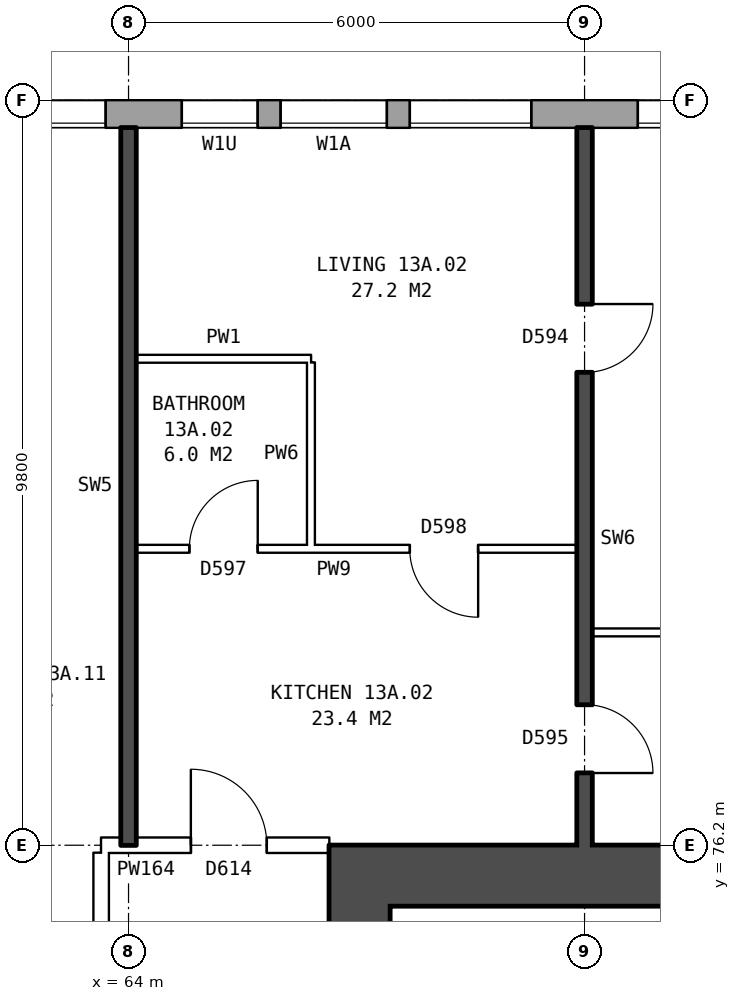
"""IFC4 building model, lengths in metres.
Left out: names, types, materials, properties, quantities, classifications, styles, units other than length and angle.
Written with IfcOpenShell. Run it as: python <this file> out.ifc"""

import sys

from ifc_helpers import new_model, si_unit, direction, frame, frame_2d, origin, place, context, subcontext, project, spatial, rectangle, extrude, element, fill, save


model = new_model("IFC4")
c1 = context("Model", 3, precision=1e-05, world=origin(), true_north=direction((0.0, 1.0)))
c2 = subcontext(c1, "Body", "Model", "MODEL_VIEW")
j1 = project(units=[si_unit("LENGTHUNIT", "METRE"), si_unit("PLANEANGLEUNIT", "RADIAN")], contexts=[c1])
p1 = place(None, origin())
s1 = spatial("IfcSite", under=j1, at=p1, CompositionType="ELEMENT")
p2 = place(p1, origin())
s2 = spatial("IfcBuilding", under=s1, at=p2, CompositionType="ELEMENT")
p3 = place(p2, frame((0.0, 0.0, 50.5)))
s3 = spatial("IfcBuildingStorey", under=s2, at=p3, CompositionType="ELEMENT", Elevation=50.5)
p4 = place(p3, frame((72.925, 85.82, 0.0), z_axis=(0.0, 0.0, 1.0), x_axis=(-1.0, 0.0, 0.0)))
e1 = element("IfcWall", 1, at=p4, inside=s3, PredefinedType="STANDARD", context=c2, shape_type="SweptSolid", body=[
    extrude(rectangle(XDim=48.351, YDim=0.36, at=frame_2d((24.175, 0.0))), origin(), (0.0, 0.0, 1.0), 2.85),
])
p5 = place(p4, frame((0.625, 0.0, 0.8)))
e2 = element("IfcOpeningElement", 2, at=p5, cuts=e1, PredefinedType="OPENING", context=c2, shape_type="SweptSolid", body=[
    extrude(rectangle(XDim=1.6, YDim=1.8, at=frame_2d((0.8, 0.9))), frame((0.0, 0.19, 0.0), z_axis=(0.0, -1.0, 0.0), x_axis=(1.0, 0.0, 0.0)), (0.0, 0.0, 1.0), 0.38),
])
p6 = place(p4, frame((3.625, 0.0, 0.8)))
e3 = element("IfcOpeningElement", 3, at=p6, cuts=e1, PredefinedType="OPENING", context=c2, shape_type="SweptSolid", body=[
    extrude(rectangle(XDim=1.6, YDim=1.8, at=frame_2d((0.8, 0.9))), frame((0.0, 0.19, 0.0), z_axis=(0.0, -1.0, 0.0), x_axis=(1.0, 0.0, 0.0)), (0.0, 0.0, 1.0), 0.38),
])
p7 = place(p4, frame((5.525, 0.0, 0.8)))
e4 = element("IfcOpeningElement", 4, at=p7, cuts=e1, PredefinedType="OPENING", context=c2, shape_type="SweptSolid", body=[
    extrude(rectangle(XDim=1.4, YDim=1.8, at=frame_2d((0.7, 0.9))), frame((0.0, 0.19, 0.0), z_axis=(0.0, -1.0, 0.0), x_axis=(1.0, 0.0, 0.0)), (0.0, 0.0, 1.0), 0.38),
])
p8 = place(p4, frame((9.225, 0.0, 0.45)))
e5 = element("IfcOpeningElement", 5, at=p8, cuts=e1, PredefinedType="OPENING", context=c2, shape_type="SweptSolid", body=[
    extrude(rectangle(XDim=1.0, YDim=0.9, at=frame_2d((0.5, 0.45))), frame((0.0, 0.19, 0.0), z_axis=(0.0, -1.0, 0.0), x_axis=(1.0, 0.0, 0.0)), (0.0, 0.0, 1.0), 0.38),
])
p9 = place(p4, frame((12.625, 0.0, 0.8)))
e6 = element("IfcOpeningElement", 6, at=p9, cuts=e1, PredefinedType="OPENING", context=c2, shape_type="SweptSolid", body=[
    extrude(rectangle(XDim=1.6, YDim=1.8, at=frame_2d((0.8, 0.9))), frame((0.0, 0.19, 0.0), z_axis=(0.0, -1.0, 0.0), x_axis=(1.0, 0.0, 0.0)), (0.0, 0.0, 1.0), 0.38),
])
p10 = place(p4, frame((15.625, 0.0, 0.8)))
e7 = element("IfcOpeningElement", 7, at=p10, cuts=e1, PredefinedType="OPENING", context=c2, shape_type="SweptSolid", body=[
    extrude(rectangle(XDim=1.6, YDim=1.8, at=frame_2d((0.8, 0.9))), frame((0.0, 0.19, 0.0), z_axis=(0.0, -1.0, 0.0), x_axis=(1.0, 0.0, 0.0)), (0.0, 0.0, 1.0), 0.38),
])
p11 = place(p4, frame((18.625, 0.0, 0.8)))
e8 = element("IfcOpeningElement", 8, at=p11, cuts=e1, PredefinedType="OPENING", context=c2, shape_type="SweptSolid", body=[
    extrude(rectangle(XDim=1.6, YDim=1.8, at=frame_2d((0.8, 0.9))), frame((0.0, 0.19, 0.0), z_axis=(0.0, -1.0, 0.0), x_axis=(1.0, 0.0, 0.0)), (0.0, 0.0, 1.0), 0.38),
])
p12 = place(p4, frame((21.625, 0.0, 0.8)))
e9 = element("IfcOpeningElement", 9, at=p12, cuts=e1, PredefinedType="OPENING", context=c2, shape_type="SweptSolid", body=[
    extrude(rectangle(XDim=1.6, YDim=1.8, at=frame_2d((0.8, 0.9))), frame((0.0, 0.19, 0.0), z_axis=(0.0, -1.0, 0.0), x_axis=(1.0, 0.0, 0.0)), (0.0, 0.0, 1.0), 0.38),
])
p13 = place(p4, frame((24.625, 0.0, 0.8)))
e10 = element("IfcOpeningElement", 10, at=p13, cuts=e1, PredefinedType="OPENING", context=c2, shape_type="SweptSolid", body=[
    extrude(rectangle(XDim=1.6, YDim=1.8, at=frame_2d((0.8, 0.9))), frame((0.0, 0.19, 0.0), z_axis=(0.0, -1.0, 0.0), x_axis=(1.0, 0.0, 0.0)), (0.0, 0.0, 1.0), 0.38),
])
p14 = place(p4, frame((27.625, 0.0, 0.8)))
e11 = element("IfcOpeningElement", 11, at=p14, cuts=e1, PredefinedType="OPENING", context=c2, shape_type="SweptSolid", body=[
    extrude(rectangle(XDim=1.6, YDim=1.8, at=frame_2d((0.8, 0.9))), frame((0.0, 0.19, 0.0), z_axis=(0.0, -1.0, 0.0), x_axis=(1.0, 0.0, 0.0)), (0.0, 0.0, 1.0), 0.38),
])
p15 = place(p4, frame((30.625, 0.0, 0.8)))
e12 = element("IfcOpeningElement", 12, at=p15, cuts=e1, PredefinedType="OPENING", context=c2, shape_type="SweptSolid", body=[
    extrude(rectangle(XDim=1.6, YDim=1.8, at=frame_2d((0.8, 0.9))), frame((0.0, 0.19, 0.0), z_axis=(0.0, -1.0, 0.0), x_axis=(1.0, 0.0, 0.0)), (0.0, 0.0, 1.0), 0.38),
])
p16 = place(p4, frame((33.625, 0.0, 0.8)))
e13 = element("IfcOpeningElement", 13, at=p16, cuts=e1, PredefinedType="OPENING", context=c2, shape_type="SweptSolid", body=[
    extrude(rectangle(XDim=1.6, YDim=1.8, at=frame_2d((0.8, 0.9))), frame((0.0, 0.19, 0.0), z_axis=(0.0, -1.0, 0.0), x_axis=(1.0, 0.0, 0.0)), (0.0, 0.0, 1.0), 0.38),
])
p17 = place(p4, frame((36.125, 0.0, 0.8)))
e14 = element("IfcOpeningElement", 14, at=p17, cuts=e1, PredefinedType="OPENING", context=c2, shape_type="SweptSolid", body=[
    extrude(rectangle(XDim=1.0, YDim=1.8, at=frame_2d((0.5, 0.9))), frame((0.0, 0.19, 0.0), z_axis=(0.0, -1.0, 0.0), x_axis=(1.0, 0.0, 0.0)), (0.0, 0.0, 1.0), 0.38),
])
p18 = place(p4, frame((39.975, 0.0, 1.7)))
e15 = element("IfcOpeningElement", 15, at=p18, cuts=e1, PredefinedType="OPENING", context=c2, shape_type="SweptSolid", body=[
    extrude(rectangle(XDim=1.0, YDim=0.9, at=frame_2d((0.5, 0.45))), frame((0.0, 0.19, 0.0), z_axis=(0.0, -1.0, 0.0), x_axis=(1.0, 0.0, 0.0)), (0.0, 0.0, 1.0), 0.38),
])
p19 = place(p4, frame((42.625, 0.0, 0.8)))
e16 = element("IfcOpeningElement", 16, at=p19, cuts=e1, PredefinedType="OPENING", context=c2, shape_type="SweptSolid", body=[
    extrude(rectangle(XDim=1.6, YDim=1.8, at=frame_2d((0.8, 0.9))), frame((0.0, 0.19, 0.0), z_axis=(0.0, -1.0, 0.0), x_axis=(1.0, 0.0, 0.0)), (0.0, 0.0, 1.0), 0.38),
])
p20 = place(p4, frame((45.625, 0.0, 0.8)))
e17 = element("IfcOpeningElement", 17, at=p20, cuts=e1, PredefinedType="OPENING", context=c2, shape_type="SweptSolid", body=[
    extrude(rectangle(XDim=1.6, YDim=1.8, at=frame_2d((0.8, 0.9))), frame((0.0, 0.19, 0.0), z_axis=(0.0, -1.0, 0.0), x_axis=(1.0, 0.0, 0.0)), (0.0, 0.0, 1.0), 0.38),
])
p21 = place(p4, frame((7.225, 0.0, 1.6)))
e18 = element("IfcOpeningElement", 18, at=p21, cuts=e1, PredefinedType="OPENING", context=c2, shape_type="SweptSolid", body=[
    extrude(rectangle(XDim=1.0, YDim=0.9, at=frame_2d((0.5, 0.45))), frame((0.0, 0.19, 0.0), z_axis=(0.0, -1.0, 0.0), x_axis=(1.0, 0.0, 0.0)), (0.0, 0.0, 1.0), 0.38),
])
p22 = place(p4, frame((10.575, 0.0, 0.45)))
e19 = element("IfcOpeningElement", 19, at=p22, cuts=e1, PredefinedType="OPENING", context=c2, shape_type="SweptSolid", body=[
    extrude(rectangle(XDim=1.2, YDim=1.8, at=frame_2d((0.6, 0.9))), frame((0.0, 0.19, 0.0), z_axis=(0.0, -1.0, 0.0), x_axis=(1.0, 0.0, 0.0)), (0.0, 0.0, 1.0), 0.38),
])
p23 = place(p4, frame((37.425, 0.0, 0.8)))
e20 = element("IfcOpeningElement", 20, at=p23, cuts=e1, PredefinedType="OPENING", context=c2, shape_type="SweptSolid", body=[
    extrude(rectangle(XDim=1.0, YDim=0.9, at=frame_2d((0.5, 0.45))), frame((0.0, 0.19, 0.0), z_axis=(0.0, -1.0, 0.0), x_axis=(1.0, 0.0, 0.0)), (0.0, 0.0, 1.0), 0.38),
])
p24 = place(p4, frame((41.275, 0.0, 0.8)))
e21 = element("IfcOpeningElement", 21, at=p24, cuts=e1, PredefinedType="OPENING", context=c2, shape_type="SweptSolid", body=[
    extrude(rectangle(XDim=1.0, YDim=1.8, at=frame_2d((0.5, 0.9))), frame((0.0, 0.19, 0.0), z_axis=(0.0, -1.0, 0.0), x_axis=(1.0, 0.0, 0.0)), (0.0, 0.0, 1.0), 0.38),
])
p25 = place(p3, frame((67.04, 64.6, 0.0), z_axis=(0.0, 0.0, 1.0), x_axis=(0.0, 1.0, 0.0)))
e22 = element("IfcWall", 22, at=p25, inside=s3, PredefinedType="SHEAR", context=c2, shape_type="SweptSolid", body=[
    extrude(rectangle(XDim=10.8, YDim=0.8, at=frame_2d((5.4, 0.0))), origin(), (0.0, 0.0, 1.0), 2.85),
])
p26 = place(p25, frame((0.525, 0.0, 0.0)))
e23 = element("IfcOpeningElement", 23, at=p26, cuts=e22, PredefinedType="OPENING", context=c2, shape_type="SweptSolid", body=[
    extrude(rectangle(XDim=1.1, YDim=2.1, at=frame_2d((0.55, 1.05))), frame((0.0, 0.41, 0.0), z_axis=(0.0, -1.0, 0.0), x_axis=(1.0, 0.0, 0.0)), (0.0, 0.0, 1.0), 0.82),
])
p27 = place(p25, frame((9.1, 0.0, 0.0)))
e24 = element("IfcOpeningElement", 24, at=p27, cuts=e22, PredefinedType="OPENING", context=c2, shape_type="SweptSolid", body=[
    extrude(rectangle(XDim=1.1, YDim=2.1, at=frame_2d((0.55, 1.05))), frame((0.0, 0.41, 0.0), z_axis=(0.0, -1.0, 0.0), x_axis=(1.0, 0.0, 0.0)), (0.0, 0.0, 1.0), 0.82),
])
p28 = place(p3, frame((66.64, 75.8, 0.0), z_axis=(0.0, 0.0, 1.0), x_axis=(1.0, 0.0, 0.0)))
e25 = element("IfcWall", 25, at=p28, inside=s3, PredefinedType="SHEAR", context=c2, shape_type="SweptSolid", body=[
    extrude(rectangle(XDim=9.0, YDim=0.8, at=frame_2d((4.5, 0.0))), origin(), (0.0, 0.0, 1.0), 2.85),
])
p29 = place(p3, frame((63.64, 63.9, 0.0), z_axis=(0.0, 0.0, 1.0), x_axis=(0.0, 1.0, 0.0)))
e26 = element("IfcWall", 26, at=p29, inside=s3, PredefinedType="PARTITIONING", context=c2, shape_type="SweptSolid", body=[
    extrude(rectangle(XDim=12.2, YDim=0.2, at=frame_2d((6.1, 0.0))), origin(), (0.0, 0.0, 1.0), 2.85),
])
p30 = place(p29, frame((5.1, 0.0, 0.0)))
e27 = element("IfcOpeningElement", 27, at=p30, cuts=e26, PredefinedType="OPENING", context=c2, shape_type="SweptSolid", body=[
    extrude(rectangle(XDim=2.0, YDim=2.1, at=frame_2d((1.0, 1.05))), frame((0.0, 0.11, 0.0), z_axis=(0.0, -1.0, 0.0), x_axis=(1.0, 0.0, 0.0)), (0.0, 0.0, 1.0), 0.22),
])
p31 = place(p3, frame((63.64, 76.2, 0.0), z_axis=(0.0, 0.0, 1.0), x_axis=(1.0, 0.0, 0.0)))
e28 = element("IfcWall", 28, at=p31, inside=s3, PredefinedType="PARTITIONING", context=c2, shape_type="SweptSolid", body=[
    extrude(rectangle(XDim=3.0, YDim=0.2, at=frame_2d((1.5, 0.0))), origin(), (0.0, 0.0, 1.0), 2.85),
])
p32 = place(p31, frame((1.18, 0.0, 0.0)))
e29 = element("IfcOpeningElement", 29, at=p32, cuts=e28, PredefinedType="OPENING", context=c2, shape_type="SweptSolid", body=[
    extrude(rectangle(XDim=1.0, YDim=2.1, at=frame_2d((0.5, 1.05))), frame((0.0, 0.11, 0.0), z_axis=(0.0, -1.0, 0.0), x_axis=(1.0, 0.0, 0.0)), (0.0, 0.0, 1.0), 0.22),
])
p33 = place(p3, frame((70.1, 79.0, 0.0), z_axis=(0.0, 0.0, 1.0), x_axis=(1.0, 0.0, 0.0)))
e30 = element("IfcWall", 30, at=p33, inside=s3, PredefinedType="PARTITIONING", context=c2, shape_type="SweptSolid", body=[
    extrude(rectangle(XDim=5.54, YDim=0.1, at=frame_2d((2.77, 0.0))), origin(), (0.0, 0.0, 1.0), 2.85),
])
p34 = place(p3, frame((64.1, 80.1, 0.0), z_axis=(0.0, 0.0, 1.0), x_axis=(1.0, 0.0, 0.0)))
e31 = element("IfcWall", 31, at=p34, inside=s3, PredefinedType="PARTITIONING", context=c2, shape_type="SweptSolid", body=[
    extrude(rectangle(XDim=5.8, YDim=0.1, at=frame_2d((2.9, 0.0))), origin(), (0.0, 0.0, 1.0), 2.85),
])
p35 = place(p34, frame((3.6, 0.0, 0.0)))
e32 = element("IfcOpeningElement", 32, at=p35, cuts=e31, PredefinedType="OPENING", context=c2, shape_type="SweptSolid", body=[
    extrude(rectangle(XDim=0.9, YDim=2.1, at=frame_2d((0.45, 1.05))), frame((0.0, 0.06, 0.0), z_axis=(0.0, -1.0, 0.0), x_axis=(1.0, 0.0, 0.0)), (0.0, 0.0, 1.0), 0.12),
])
p36 = place(p34, frame((0.7, 0.0, 0.0)))
e33 = element("IfcOpeningElement", 33, at=p36, cuts=e31, PredefinedType="OPENING", context=c2, shape_type="SweptSolid", body=[
    extrude(rectangle(XDim=0.9, YDim=2.1, at=frame_2d((0.45, 1.05))), frame((0.0, 0.06, 0.0), z_axis=(0.0, -1.0, 0.0), x_axis=(1.0, 0.0, 0.0)), (0.0, 0.0, 1.0), 0.12),
])
p37 = place(p3, frame((64.1, 82.6, 0.0), z_axis=(0.0, 0.0, 1.0), x_axis=(1.0, 0.0, 0.0)))
e34 = element("IfcWall", 34, at=p37, inside=s3, PredefinedType="PARTITIONING", context=c2, shape_type="SweptSolid", body=[
    extrude(rectangle(XDim=2.3, YDim=0.1, at=frame_2d((1.15, 0.0))), origin(), (0.0, 0.0, 1.0), 2.85),
])
p38 = place(p3, frame((64.0, 76.2, 0.0), z_axis=(0.0, 0.0, 1.0), x_axis=(0.0, 1.0, 0.0)))
e35 = element("IfcWall", 35, at=p38, inside=s3, PredefinedType="SOLIDWALL", context=c2, shape_type="SweptSolid", body=[
    extrude(rectangle(XDim=9.44, YDim=0.2, at=frame_2d((4.72, 0.0))), origin(), (0.0, 0.0, 1.0), 2.85),
])
p39 = place(p3, frame((66.4, 80.15, 0.0), z_axis=(0.0, 0.0, 1.0), x_axis=(0.0, 1.0, 0.0)))
e36 = element("IfcWall", 36, at=p39, inside=s3, PredefinedType="PARTITIONING", context=c2, shape_type="SweptSolid", body=[
    extrude(rectangle(XDim=2.4, YDim=0.1, at=frame_2d((1.2, 0.0))), origin(), (0.0, 0.0, 1.0), 2.85),
])
p40 = place(p3, frame((70.0, 76.2, 0.0), z_axis=(0.0, 0.0, 1.0), x_axis=(0.0, 1.0, 0.0)))
e37 = element("IfcWall", 37, at=p40, inside=s3, PredefinedType="SOLIDWALL", context=c2, shape_type="SweptSolid", body=[
    extrude(rectangle(XDim=9.44, YDim=0.2, at=frame_2d((4.72, 0.0))), origin(), (0.0, 0.0, 1.0), 2.85),
])
p41 = place(p40, frame((6.22, 0.0, 0.0)))
e38 = element("IfcOpeningElement", 38, at=p41, cuts=e37, PredefinedType="OPENING", context=c2, shape_type="SweptSolid", body=[
    extrude(rectangle(XDim=0.9, YDim=2.1, at=frame_2d((0.45, 1.05))), frame((0.0, 0.11, 0.0), z_axis=(0.0, -1.0, 0.0), x_axis=(1.0, 0.0, 0.0)), (0.0, 0.0, 1.0), 0.22),
])
p42 = place(p40, frame((0.95, 0.0, 0.0)))
e39 = element("IfcOpeningElement", 39, at=p42, cuts=e37, PredefinedType="OPENING", context=c2, shape_type="SweptSolid", body=[
    extrude(rectangle(XDim=0.9, YDim=2.1, at=frame_2d((0.45, 1.05))), frame((0.0, 0.11, 0.0), z_axis=(0.0, -1.0, 0.0), x_axis=(1.0, 0.0, 0.0)), (0.0, 0.0, 1.0), 0.22),
])
p43 = place(p5, origin())
e40 = element("IfcWindow", 40, at=p43, inside=s3, PartitioningType="SINGLE_PANEL", PredefinedType="WINDOW", context=c2, shape_type="SweptSolid", body=[
    extrude(rectangle(XDim=1.6, YDim=1.8, at=frame_2d((0.8, 0.9))), frame((0.0, 0.15, 0.0), z_axis=(0.0, -1.0, 0.0), x_axis=(1.0, 0.0, 0.0)), (0.0, 0.0, 1.0), 0.06),
])
fill(e2, e40)
p44 = place(p6, origin())
e41 = element("IfcWindow", 41, at=p44, inside=s3, PartitioningType="SINGLE_PANEL", PredefinedType="WINDOW", context=c2, shape_type="SweptSolid", body=[
    extrude(rectangle(XDim=1.6, YDim=1.8, at=frame_2d((0.8, 0.9))), frame((0.0, 0.15, 0.0), z_axis=(0.0, -1.0, 0.0), x_axis=(1.0, 0.0, 0.0)), (0.0, 0.0, 1.0), 0.06),
])
fill(e3, e41)
p45 = place(p7, origin())
e42 = element("IfcWindow", 42, at=p45, inside=s3, PartitioningType="SINGLE_PANEL", PredefinedType="WINDOW", context=c2, shape_type="SweptSolid", body=[
    extrude(rectangle(XDim=1.4, YDim=1.8, at=frame_2d((0.7, 0.9))), frame((0.0, 0.15, 0.0), z_axis=(0.0, -1.0, 0.0), x_axis=(1.0, 0.0, 0.0)), (0.0, 0.0, 1.0), 0.06),
])
fill(e4, e42)
p46 = place(p8, origin())
e43 = element("IfcWindow", 43, at=p46, inside=s3, PartitioningType="SINGLE_PANEL", PredefinedType="WINDOW", context=c2, shape_type="SweptSolid", body=[
    extrude(rectangle(XDim=1.0, YDim=0.9, at=frame_2d((0.5, 0.45))), frame((0.0, 0.15, 0.0), z_axis=(0.0, -1.0, 0.0), x_axis=(1.0, 0.0, 0.0)), (0.0, 0.0, 1.0), 0.06),
])
fill(e5, e43)
p47 = place(p41, frame((0.9, 0.0, 0.0), z_axis=(0.0, 0.0, 1.0), x_axis=(-1.0, 0.0, 0.0)))
e44 = element("IfcDoor", 44, at=p47, inside=s3, OperationType="SINGLE_SWING_LEFT", PredefinedType="DOOR", context=c2, shape_type="SweptSolid", body=[
    extrude(rectangle(XDim=0.9, YDim=2.1, at=frame_2d((0.45, 1.05))), frame((0.0, 0.025, 0.0), z_axis=(0.0, -1.0, 0.0), x_axis=(1.0, 0.0, 0.0)), (0.0, 0.0, 1.0), 0.05),
])
fill(e38, e44)
p48 = place(p42, frame((0.9, 0.0, 0.0), z_axis=(0.0, 0.0, 1.0), x_axis=(-1.0, 0.0, 0.0)))
e45 = element("IfcDoor", 45, at=p48, inside=s3, OperationType="SINGLE_SWING_RIGHT", PredefinedType="DOOR", context=c2, shape_type="SweptSolid", body=[
    extrude(rectangle(XDim=0.9, YDim=2.1, at=frame_2d((0.45, 1.05))), frame((0.0, 0.025, 0.0), z_axis=(0.0, -1.0, 0.0), x_axis=(1.0, 0.0, 0.0)), (0.0, 0.0, 1.0), 0.05),
])
fill(e39, e45)
p49 = place(p32, origin())
e46 = element("IfcDoor", 46, at=p49, inside=s3, OperationType="SINGLE_SWING_LEFT", PredefinedType="DOOR", context=c2, shape_type="SweptSolid", body=[
    extrude(rectangle(XDim=1.0, YDim=2.1, at=frame_2d((0.5, 1.05))), frame((0.0, 0.025, 0.0), z_axis=(0.0, -1.0, 0.0), x_axis=(1.0, 0.0, 0.0)), (0.0, 0.0, 1.0), 0.05),
])
fill(e29, e46)
p50 = place(p35, frame((0.9, 0.0, 0.0), z_axis=(0.0, 0.0, 1.0), x_axis=(-1.0, 0.0, 0.0)))
e47 = element("IfcDoor", 47, at=p50, inside=s3, OperationType="SINGLE_SWING_LEFT", PredefinedType="DOOR", context=c2, shape_type="SweptSolid", body=[
    extrude(rectangle(XDim=0.9, YDim=2.1, at=frame_2d((0.45, 1.05))), frame((0.0, 0.025, 0.0), z_axis=(0.0, -1.0, 0.0), x_axis=(1.0, 0.0, 0.0)), (0.0, 0.0, 1.0), 0.05),
])
fill(e32, e47)
p51 = place(p36, origin())
e48 = element("IfcDoor", 48, at=p51, inside=s3, OperationType="SINGLE_SWING_RIGHT", PredefinedType="DOOR", context=c2, shape_type="SweptSolid", body=[
    extrude(rectangle(XDim=0.9, YDim=2.1, at=frame_2d((0.45, 1.05))), frame((0.0, 0.025, 0.0), z_axis=(0.0, -1.0, 0.0), x_axis=(1.0, 0.0, 0.0)), (0.0, 0.0, 1.0), 0.05),
])
fill(e33, e48)
p52 = place(p21, origin())
e49 = element("IfcWindow", 49, at=p52, inside=s3, PartitioningType="SINGLE_PANEL", PredefinedType="WINDOW", context=c2, shape_type="SweptSolid", body=[
    extrude(rectangle(XDim=1.0, YDim=0.9, at=frame_2d((0.5, 0.45))), frame((0.0, 0.15, 0.0), z_axis=(0.0, -1.0, 0.0), x_axis=(1.0, 0.0, 0.0)), (0.0, 0.0, 1.0), 0.06),
])
fill(e18, e49)
save(model, sys.argv[1])
